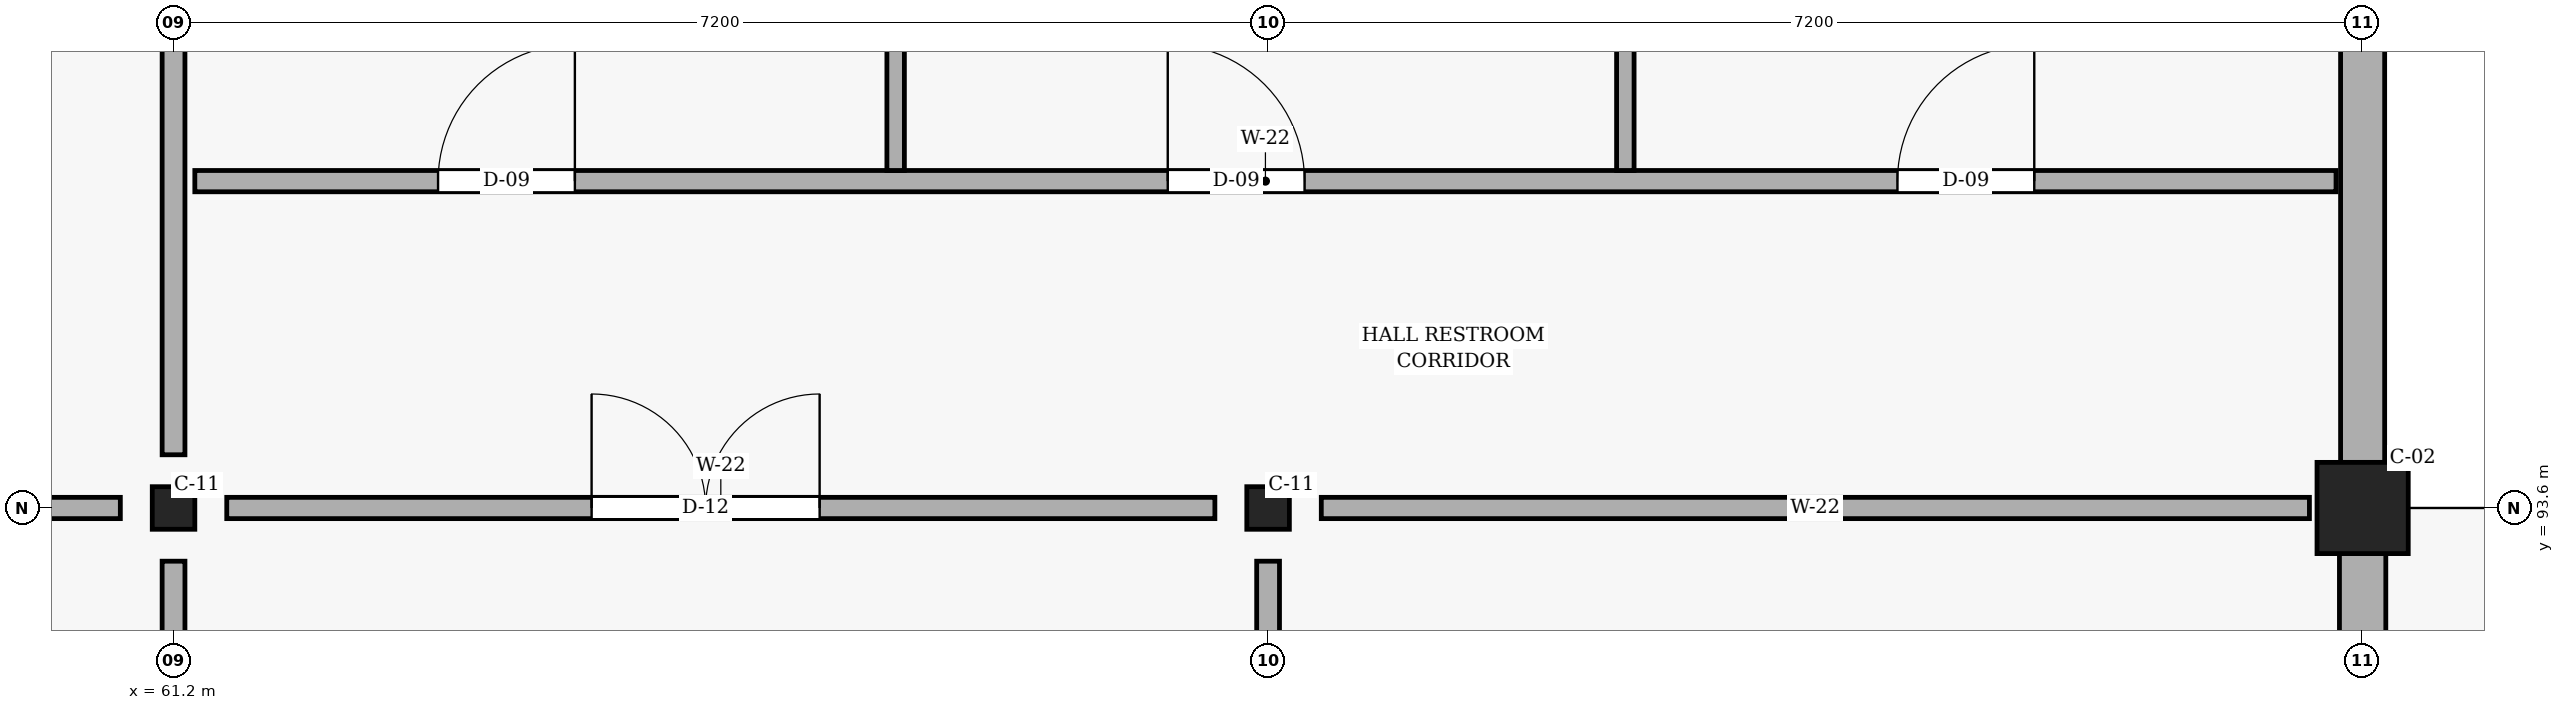
"""IFC4 building model, lengths in metres.
Left out: names, types, materials, properties, quantities, classifications, styles, units other than length and angle.
Written with IfcOpenShell. Run it as: python <this file> out.ifc"""

import sys

from ifc_helpers import new_model, si_unit, direction, frame, frame_2d, origin, origin_2d, place, context, subcontext, project, spatial, rectangle, i_section, extrude, element, fill, save


model = new_model("IFC4")
c1 = context("Model", 3, precision=1e-05, world=origin(), true_north=direction((0.0, 1.0)))
c2 = subcontext(c1, "Body", "Model", "MODEL_VIEW")
j1 = project(units=[si_unit("LENGTHUNIT", "METRE"), si_unit("PLANEANGLEUNIT", "RADIAN")], contexts=[c1])
p1 = place(None, origin())
s1 = spatial("IfcSite", under=j1, at=p1, CompositionType="ELEMENT")
p2 = place(p1, origin())
s2 = spatial("IfcBuilding", under=s1, at=p2, CompositionType="ELEMENT")
p3 = place(p2, origin())
s3 = spatial("IfcBuildingStorey", under=s2, at=p3, CompositionType="ELEMENT", Elevation=0.0)
for number, where, z_axis, x_axis in (
    (1, (61.2, 93.6, 0.0), (0.0, 0.0, 1.0), (1.0, 0.0, 0.0)),
    (2, (68.4, 93.6, 0.0), (0.0, 0.0, 1.0), (1.0, 0.0, 0.0)),
):
    element("IfcColumn", number, at=place(p3, frame(where, z_axis=z_axis, x_axis=x_axis)), inside=s3, PredefinedType="COLUMN", context=c2, shape_type="SweptSolid", body=[
        extrude(i_section(OverallWidth=0.28, OverallDepth=0.28, WebThickness=0.01, FlangeThickness=0.018, FilletRadius=0.024, at=origin_2d()), origin(), (0.0, 0.0, 1.0), 8.1),
    ])
p4 = place(p3, frame((75.6, 93.6, 0.0), z_axis=(0.0, 0.0, 1.0), x_axis=(1.0, 0.0, 0.0)))
e3 = element("IfcColumn", 3, at=p4, inside=s3, PredefinedType="COLUMN", context=c2, shape_type="SweptSolid", body=[
    extrude(rectangle(XDim=0.6, YDim=0.6, at=origin_2d()), origin(), (0.0, 0.0, 1.0), 9.295),
])
p5 = place(p3, frame((75.6, 86.7, 0.0), z_axis=(0.0, 0.0, 1.0), x_axis=(0.0, 1.0, 0.0)))
e4 = element("IfcWall", 4, at=p5, inside=s3, PredefinedType="SOLIDWALL", context=c2, shape_type="SweptSolid", body=[
    extrude(rectangle(XDim=6.6, YDim=0.305, at=frame_2d((3.3, 0.0))), origin(), (0.0, 0.0, 1.0), 6.95),
])
p6 = place(p5, frame((2.5, 0.0, 0.0)))
e5 = element("IfcOpeningElement", 5, at=p6, cuts=e4, PredefinedType="OPENING", context=c2, shape_type="SweptSolid", body=[
    extrude(rectangle(XDim=1.6, YDim=2.25, at=frame_2d((0.8, 1.125))), frame((0.0, 0.163, 0.0), z_axis=(0.0, -1.0, 0.0), x_axis=(1.0, 0.0, 0.0)), (0.0, 0.0, 1.0), 0.325),
])
p7 = place(p3, frame((75.6, 93.9, 0.0), z_axis=(0.0, 0.0, 1.0), x_axis=(0.0, 1.0, 0.0)))
e6 = element("IfcWall", 6, at=p7, inside=s3, PredefinedType="SOLIDWALL", context=c2, shape_type="SweptSolid", body=[
    extrude(rectangle(XDim=6.6, YDim=0.29, at=frame_2d((3.3, 0.0))), origin(), (0.0, 0.0, 1.0), 6.95),
])
p8 = place(p7, frame((3.255, 0.0, 0.85)))
e7 = element("IfcOpeningElement", 7, at=p8, cuts=e6, PredefinedType="OPENING", context=c2, shape_type="SweptSolid", body=[
    extrude(rectangle(XDim=1.8, YDim=2.1, at=frame_2d((0.9, 1.05))), frame((0.0, 0.155, 0.0), z_axis=(0.0, -1.0, 0.0), x_axis=(1.0, 0.0, 0.0)), (0.0, 0.0, 1.0), 0.31),
])
p9 = place(p3, frame((61.2, 86.75, 0.0), z_axis=(0.0, 0.0, 1.0), x_axis=(0.0, 1.0, 0.0)))
e8 = element("IfcWall", 8, at=p9, inside=s3, PredefinedType="PARTITIONING", context=c2, shape_type="SweptSolid", body=[
    extrude(rectangle(XDim=6.5, YDim=0.15, at=frame_2d((3.25, 0.0))), origin(), (0.0, 0.0, 1.0), 4.1),
])
p10 = place(p9, frame((2.4, 0.0, 0.0)))
e9 = element("IfcOpeningElement", 9, at=p10, cuts=e8, PredefinedType="OPENING", context=c2, shape_type="SweptSolid", body=[
    extrude(rectangle(XDim=1.5, YDim=2.25, at=frame_2d((0.75, 1.125))), frame((0.0, 0.085, 0.0), z_axis=(0.0, -1.0, 0.0), x_axis=(1.0, 0.0, 0.0)), (0.0, 0.0, 1.0), 0.17),
])
p11 = place(p3, frame((61.2, 93.95, 0.0), z_axis=(0.0, 0.0, 1.0), x_axis=(0.0, 1.0, 0.0)))
e10 = element("IfcWall", 10, at=p11, inside=s3, PredefinedType="PARTITIONING", context=c2, shape_type="SweptSolid", body=[
    extrude(rectangle(XDim=6.5, YDim=0.15, at=frame_2d((3.25, 0.0))), origin(), (0.0, 0.0, 1.0), 4.1),
])
p12 = place(p3, frame((39.95, 93.6, 0.0), z_axis=(0.0, 0.0, 1.0), x_axis=(1.0, 0.0, 0.0)))
e11 = element("IfcWall", 11, at=p12, inside=s3, PredefinedType="PARTITIONING", context=c2, shape_type="SweptSolid", body=[
    extrude(rectangle(XDim=20.9, YDim=0.14, at=frame_2d((10.45, 0.0))), origin(), (0.0, 0.0, 1.0), 4.1),
])
p13 = place(p12, frame((2.8, 0.0, 0.0)))
e12 = element("IfcOpeningElement", 12, at=p13, cuts=e11, PredefinedType="OPENING", context=c2, shape_type="SweptSolid", body=[
    extrude(rectangle(XDim=1.5, YDim=2.25, at=frame_2d((0.75, 1.125))), frame((0.0, 0.08, 0.0), z_axis=(0.0, -1.0, 0.0), x_axis=(1.0, 0.0, 0.0)), (0.0, 0.0, 1.0), 0.16),
])
p14 = place(p12, frame((15.6, 0.0, 0.0)))
e13 = element("IfcOpeningElement", 13, at=p14, cuts=e11, PredefinedType="OPENING", context=c2, shape_type="SweptSolid", body=[
    extrude(rectangle(XDim=1.5, YDim=2.25, at=frame_2d((0.75, 1.125))), frame((0.0, 0.08, 0.0), z_axis=(0.0, -1.0, 0.0), x_axis=(1.0, 0.0, 0.0)), (0.0, 0.0, 1.0), 0.16),
])
p15 = place(p3, frame((68.4, 86.75, 0.0), z_axis=(0.0, 0.0, 1.0), x_axis=(0.0, 1.0, 0.0)))
e14 = element("IfcWall", 14, at=p15, inside=s3, PredefinedType="PARTITIONING", context=c2, shape_type="SweptSolid", body=[
    extrude(rectangle(XDim=6.5, YDim=0.15, at=frame_2d((3.25, 0.0))), origin(), (0.0, 0.0, 1.0), 4.1),
])
p16 = place(p15, frame((2.5, 0.0, 0.0)))
e15 = element("IfcOpeningElement", 15, at=p16, cuts=e14, PredefinedType="OPENING", context=c2, shape_type="SweptSolid", body=[
    extrude(rectangle(XDim=1.08, YDim=2.15, at=frame_2d((0.54, 1.075))), frame((0.0, 0.085, 0.0), z_axis=(0.0, -1.0, 0.0), x_axis=(1.0, 0.0, 0.0)), (0.0, 0.0, 1.0), 0.17),
])
p17 = place(p3, frame((61.55, 93.6, 0.0), z_axis=(0.0, 0.0, 1.0), x_axis=(1.0, 0.0, 0.0)))
e16 = element("IfcWall", 16, at=p17, inside=s3, PredefinedType="PARTITIONING", context=c2, shape_type="SweptSolid", body=[
    extrude(rectangle(XDim=6.5, YDim=0.14, at=frame_2d((3.25, 0.0))), origin(), (0.0, 0.0, 1.0), 4.1),
])
p18 = place(p17, frame((2.4, 0.0, 0.0)))
e17 = element("IfcOpeningElement", 17, at=p18, cuts=e16, PredefinedType="OPENING", context=c2, shape_type="SweptSolid", body=[
    extrude(rectangle(XDim=1.5, YDim=2.25, at=frame_2d((0.75, 1.125))), frame((0.0, 0.08, 0.0), z_axis=(0.0, -1.0, 0.0), x_axis=(1.0, 0.0, 0.0)), (0.0, 0.0, 1.0), 0.16),
])
p19 = place(p3, frame((68.75, 93.6, 0.0), z_axis=(0.0, 0.0, 1.0), x_axis=(1.0, 0.0, 0.0)))
e18 = element("IfcWall", 18, at=p19, inside=s3, PredefinedType="PARTITIONING", context=c2, shape_type="SweptSolid", body=[
    extrude(rectangle(XDim=6.5, YDim=0.14, at=frame_2d((3.25, 0.0))), origin(), (0.0, 0.0, 1.0), 4.1),
])
p20 = place(p3, frame((61.34, 95.75, 0.0), z_axis=(0.0, 0.0, 1.0), x_axis=(1.0, 0.0, 0.0)))
e19 = element("IfcWall", 19, at=p20, inside=s3, PredefinedType="PARTITIONING", context=c2, shape_type="SweptSolid", body=[
    extrude(rectangle(XDim=14.085, YDim=0.14, at=frame_2d((7.042, 0.0))), origin(), (0.0, 0.0, 1.0), 4.1),
])
p21 = place(p20, frame((1.6, 0.0, 0.0)))
e20 = element("IfcOpeningElement", 20, at=p21, cuts=e19, PredefinedType="OPENING", context=c2, shape_type="SweptSolid", body=[
    extrude(rectangle(XDim=0.9, YDim=2.05, at=frame_2d((0.45, 1.025))), frame((0.0, 0.08, 0.0), z_axis=(0.0, -1.0, 0.0), x_axis=(1.0, 0.0, 0.0)), (0.0, 0.0, 1.0), 0.16),
])
p22 = place(p20, frame((6.4, 0.0, 0.0)))
e21 = element("IfcOpeningElement", 21, at=p22, cuts=e19, PredefinedType="OPENING", context=c2, shape_type="SweptSolid", body=[
    extrude(rectangle(XDim=0.9, YDim=2.05, at=frame_2d((0.45, 1.025))), frame((0.0, 0.08, 0.0), z_axis=(0.0, -1.0, 0.0), x_axis=(1.0, 0.0, 0.0)), (0.0, 0.0, 1.0), 0.16),
])
p23 = place(p20, frame((11.2, 0.0, 0.0)))
e22 = element("IfcOpeningElement", 22, at=p23, cuts=e19, PredefinedType="OPENING", context=c2, shape_type="SweptSolid", body=[
    extrude(rectangle(XDim=0.9, YDim=2.05, at=frame_2d((0.45, 1.025))), frame((0.0, 0.08, 0.0), z_axis=(0.0, -1.0, 0.0), x_axis=(1.0, 0.0, 0.0)), (0.0, 0.0, 1.0), 0.16),
])
for number, where, z_axis, x_axis in (
    (23, (65.95, 95.82, 0.0), (0.0, 0.0, 1.0), (0.0, 1.0, 0.0)),
    (24, (70.75, 95.82, 0.0), (0.0, 0.0, 1.0), (0.0, 1.0, 0.0)),
):
    element("IfcWall", number, at=place(p3, frame(where, z_axis=z_axis, x_axis=x_axis)), inside=s3, PredefinedType="PARTITIONING", context=c2, shape_type="SweptSolid", body=[
        extrude(rectangle(XDim=4.805, YDim=0.115, at=frame_2d((2.402, 0.0))), origin(), (0.0, 0.0, 1.0), 4.1),
    ])
p24 = place(p18, origin())
e25 = element("IfcDoor", 25, at=p24, inside=s3, OperationType="DOUBLE_DOOR_SINGLE_SWING", PredefinedType="DOOR", context=c2, shape_type="SweptSolid", body=[
    extrude(rectangle(XDim=1.5, YDim=2.25, at=frame_2d((0.75, 1.125))), frame((0.0, 0.025, 0.0), z_axis=(0.0, -1.0, 0.0), x_axis=(1.0, 0.0, 0.0)), (0.0, 0.0, 1.0), 0.05),
])
fill(e17, e25)
p25 = place(p21, origin())
e26 = element("IfcDoor", 26, at=p25, inside=s3, OperationType="SINGLE_SWING_RIGHT", PredefinedType="DOOR", context=c2, shape_type="SweptSolid", body=[
    extrude(rectangle(XDim=0.9, YDim=2.05, at=frame_2d((0.45, 1.025))), frame((0.0, 0.025, 0.0), z_axis=(0.0, -1.0, 0.0), x_axis=(1.0, 0.0, 0.0)), (0.0, 0.0, 1.0), 0.05),
])
fill(e20, e26)
p26 = place(p22, origin())
e27 = element("IfcDoor", 27, at=p26, inside=s3, OperationType="SINGLE_SWING_LEFT", PredefinedType="DOOR", context=c2, shape_type="SweptSolid", body=[
    extrude(rectangle(XDim=0.9, YDim=2.05, at=frame_2d((0.45, 1.025))), frame((0.0, 0.025, 0.0), z_axis=(0.0, -1.0, 0.0), x_axis=(1.0, 0.0, 0.0)), (0.0, 0.0, 1.0), 0.05),
])
fill(e21, e27)
p27 = place(p23, origin())
e28 = element("IfcDoor", 28, at=p27, inside=s3, OperationType="SINGLE_SWING_RIGHT", PredefinedType="DOOR", context=c2, shape_type="SweptSolid", body=[
    extrude(rectangle(XDim=0.9, YDim=2.05, at=frame_2d((0.45, 1.025))), frame((0.0, 0.025, 0.0), z_axis=(0.0, -1.0, 0.0), x_axis=(1.0, 0.0, 0.0)), (0.0, 0.0, 1.0), 0.05),
])
fill(e22, e28)
save(model, sys.argv[1])
